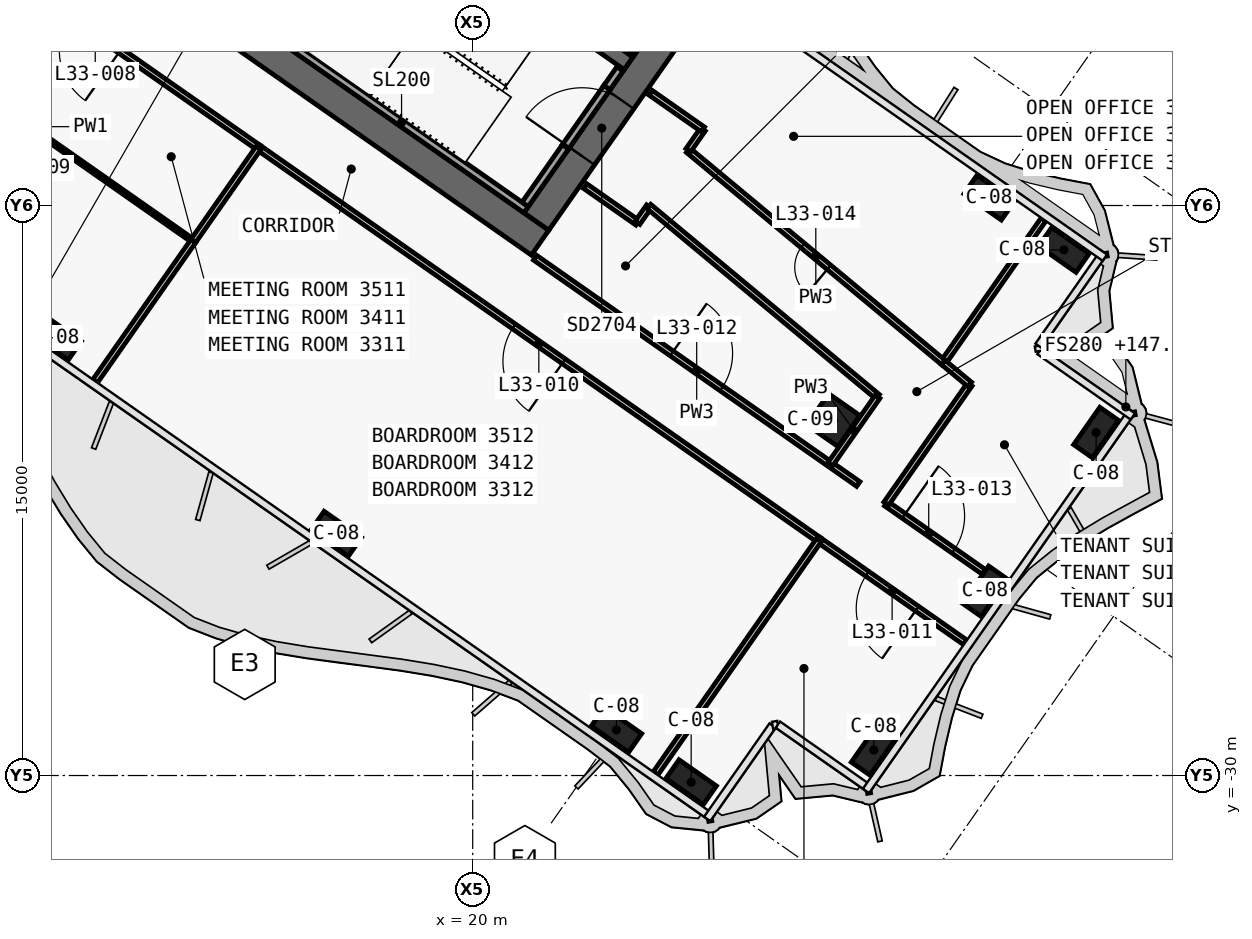
"""IFC4 building model, lengths in metres.
Left out: names, types, materials, properties, quantities, classifications, styles, units other than length and angle.
Written with IfcOpenShell. Run it as: python <this file> out.ifc"""

import sys

from ifc_helpers import new_model, si_unit, direction, frame, frame_2d, origin, origin_2d, place, context, subcontext, project, spatial, polyline, rectangle, outline, extrude, element, fill, save


model = new_model("IFC4")
c1 = context("Model", 3, precision=1e-05, world=origin(), true_north=direction((0.0, 1.0)))
c2 = subcontext(c1, "Body", "Model", "MODEL_VIEW")
j1 = project(units=[si_unit("LENGTHUNIT", "METRE"), si_unit("PLANEANGLEUNIT", "RADIAN")], contexts=[c1])
p1 = place(None, origin())
s1 = spatial("IfcSite", under=j1, at=p1, CompositionType="ELEMENT")
p2 = place(p1, origin())
s2 = spatial("IfcBuilding", under=s1, at=p2, CompositionType="ELEMENT")
p3 = place(p2, frame((0.0, 0.0, 147.6)))
s3 = spatial("IfcBuildingStorey", under=s2, at=p3, CompositionType="ELEMENT", Elevation=147.6)
p4 = place(p3, frame((-0.029, -0.712, 0.0), z_axis=(0.0, 0.0, 1.0), x_axis=(0.819151758019, -0.573576845187, 0.0)))
e1 = element("IfcWall", 1, at=p4, inside=s3, PredefinedType="SHEAR", context=c2, shape_type="SweptSolid", body=[
    extrude(outline(polyline([(26.616, 0.4), (-0.0, 0.4), (0.56, -0.4), (26.616, -0.4), (26.616, 0.4)])), origin(), (0.0, 0.0, 1.0), 3.9),
])
p5 = place(p4, frame((1.166, 0.0, 0.0)))
e2 = element("IfcOpeningElement", 2, at=p5, cuts=e1, PredefinedType="OPENING", context=c2, shape_type="SweptSolid", body=[
    extrude(rectangle(XDim=1.5, YDim=2.1, at=frame_2d((0.75, 1.05))), frame((0.0, 0.41, 0.0), z_axis=(0.0, -1.0, 0.0), x_axis=(1.0, 0.0, 0.0)), (0.0, 0.0, 1.0), 0.82),
])
p6 = place(p4, frame((12.366, 0.0, 0.0)))
e3 = element("IfcOpeningElement", 3, at=p6, cuts=e1, PredefinedType="OPENING", context=c2, shape_type="SweptSolid", body=[
    extrude(rectangle(XDim=1.5, YDim=2.1, at=frame_2d((0.75, 1.05))), frame((0.0, 0.41, 0.0), z_axis=(0.0, -1.0, 0.0), x_axis=(1.0, 0.0, 0.0)), (0.0, 0.0, 1.0), 0.82),
])
p7 = place(p3, frame((21.675, -15.421, 0.0), z_axis=(0.0, 0.0, 1.0), x_axis=(0.573581815061, 0.819148278049, 0.0)))
e4 = element("IfcWall", 4, at=p7, inside=s3, PredefinedType="SHEAR", context=c2, shape_type="SweptSolid", body=[
    extrude(outline(polyline([(9.6, 0.4), (0.0, 0.4), (0.0, -0.4), (9.6, -0.4), (9.6, 0.4)])), origin(), (0.0, 0.0, 1.0), 3.9),
])
p8 = place(p7, frame((6.3, 0.0, 0.0)))
e5 = element("IfcOpeningElement", 5, at=p8, cuts=e4, PredefinedType="OPENING", context=c2, shape_type="SweptSolid", body=[
    extrude(rectangle(XDim=1.8, YDim=2.1, at=frame_2d((0.9, 1.05))), frame((0.0, 0.41, 0.0), z_axis=(0.0, -1.0, 0.0), x_axis=(1.0, 0.0, 0.0)), (0.0, 0.0, 1.0), 0.82),
])
p9 = place(p7, frame((2.1, 0.0, 0.0)))
e6 = element("IfcOpeningElement", 6, at=p9, cuts=e4, PredefinedType="OPENING", context=c2, shape_type="SweptSolid", body=[
    extrude(rectangle(XDim=1.8, YDim=2.1, at=frame_2d((0.9, 1.05))), frame((0.0, 0.41, 0.0), z_axis=(0.0, -1.0, 0.0), x_axis=(1.0, 0.0, 0.0)), (0.0, 0.0, 1.0), 0.82),
])
p10 = place(p3, frame((2.638, 3.768, 0.0), z_axis=(0.0, 0.0, 1.0), x_axis=(0.81915267502, -0.573575535572, 0.0)))
e7 = element("IfcWall", 7, at=p10, inside=s3, PredefinedType="SHEAR", context=c2, shape_type="SweptSolid", body=[
    extrude(outline(polyline([(0.0, 0.2), (0.0, -0.2), (26.2, -0.2), (26.2, 0.2), (0.0, 0.2)])), origin(), (0.0, 0.0, 1.0), 3.9),
])
p11 = place(p10, frame((9.637, 0.0, 0.0)))
e8 = element("IfcOpeningElement", 8, at=p11, cuts=e7, PredefinedType="OPENING", context=c2, shape_type="SweptSolid", body=[
    extrude(rectangle(XDim=1.2, YDim=2.1, at=frame_2d((0.6, 1.05))), frame((0.0, 0.21, 0.0), z_axis=(0.0, -1.0, 0.0), x_axis=(1.0, 0.0, 0.0)), (0.0, 0.0, 1.0), 0.42),
])
p12 = place(p10, frame((11.812, 0.0, 0.0)))
e9 = element("IfcOpeningElement", 9, at=p12, cuts=e7, PredefinedType="OPENING", context=c2, shape_type="SweptSolid", body=[
    extrude(rectangle(XDim=1.2, YDim=2.1, at=frame_2d((0.6, 1.05))), frame((0.0, 0.21, 0.0), z_axis=(0.0, -1.0, 0.0), x_axis=(1.0, 0.0, 0.0)), (0.0, 0.0, 1.0), 0.42),
])
p13 = place(p10, frame((13.988, 0.0, 0.0)))
e10 = element("IfcOpeningElement", 10, at=p13, cuts=e7, PredefinedType="OPENING", context=c2, shape_type="SweptSolid", body=[
    extrude(rectangle(XDim=1.2, YDim=2.1, at=frame_2d((0.6, 1.05))), frame((0.0, 0.21, 0.0), z_axis=(0.0, -1.0, 0.0), x_axis=(1.0, 0.0, 0.0)), (0.0, 0.0, 1.0), 0.42),
])
p14 = place(p10, frame((16.262, 0.0, 0.0)))
e11 = element("IfcOpeningElement", 11, at=p14, cuts=e7, PredefinedType="OPENING", context=c2, shape_type="SweptSolid", body=[
    extrude(rectangle(XDim=1.0, YDim=2.1, at=frame_2d((0.5, 1.05))), frame((0.0, 0.21, 0.0), z_axis=(0.0, -1.0, 0.0), x_axis=(1.0, 0.0, 0.0)), (0.0, 0.0, 1.0), 0.42),
])
for number, where, z_axis, x_axis in (
    (12, (9.038, -18.475, 0.0), (0.0, 0.0, 1.0), (0.819, -0.574, 0.0)),
    (13, (16.41, -23.637, 0.0), (0.0, 0.0, 1.0), (0.819, -0.574, 0.0)),
    (14, (23.782, -28.799, 0.0), (0.0, 0.0, 1.0), (0.819, -0.574, 0.0)),
    (15, (25.748, -30.176, 0.0), (0.0, 0.0, 1.0), (0.819, -0.574, 0.0)),
    (16, (33.591, -14.792, 0.0), (0.0, 0.0, 1.0), (0.819, -0.574, 0.0)),
    (17, (35.556, -16.168, 0.0), (0.0, 0.0, 1.0), (0.819, -0.574, 0.0)),
    (18, (30.553, -29.329, 0.0), (0.0, 0.0, 1.0), (0.574, 0.819, 0.0)),
    (19, (33.479, -25.151, 0.0), (0.0, 0.0, 1.0), (0.574, 0.819, 0.0)),
    (20, (36.404, -20.973, 0.0), (0.0, 0.0, 1.0), (0.574, 0.819, 0.0)),
):
    element("IfcColumn", number, at=place(p3, frame(where, z_axis=z_axis, x_axis=x_axis)), inside=s3, PredefinedType="COLUMN", context=c2, shape_type="SweptSolid", body=[
        extrude(rectangle(XDim=1.2, YDim=0.6, at=origin_2d()), origin(), (0.0, 0.0, 1.0), 3.9),
    ])
p15 = place(p3, frame((29.49, -20.649, 0.0), z_axis=(0.0, 0.0, 1.0), x_axis=(0.819152044289, -0.573576436351, 0.0)))
e21 = element("IfcColumn", 21, at=p15, inside=s3, PredefinedType="COLUMN", context=c2, shape_type="SweptSolid", body=[
    extrude(rectangle(XDim=1.0, YDim=1.0, at=origin_2d()), origin(), (0.0, 0.0, 1.0), 3.9),
])
p16 = place(p3, frame((24.162, -10.998, 0.0), z_axis=(0.0, 0.0, 1.0), x_axis=(0.573612502218, 0.819126789514, 0.0)))
e22 = element("IfcWall", 22, at=p16, inside=s3, PredefinedType="SOLIDWALL", context=c2, shape_type="SweptSolid", body=[
    extrude(rectangle(XDim=1.2, YDim=0.2, at=frame_2d((0.6, 0.0))), origin(), (0.0, 0.0, 1.0), 3.62),
])
p17 = place(p3, frame((14.851, -10.521, 0.0), z_axis=(0.0, 0.0, 1.0), x_axis=(0.819141584393, -0.57359137434, 0.0)))
e23 = element("IfcWall", 23, at=p17, inside=s3, PredefinedType="SOLIDWALL", context=c2, shape_type="SweptSolid", body=[
    extrude(rectangle(XDim=8.0, YDim=0.2, at=frame_2d((4.0, 0.0))), origin(), (0.0, 0.0, 1.0), 3.62),
])
p18 = place(p3, frame((21.38, -14.97, 0.0), z_axis=(0.0, 0.0, 1.0), x_axis=(0.573559770908, 0.819163713305, 0.0)))
e24 = element("IfcWall", 24, at=p18, inside=s3, PredefinedType="SOLIDWALL", context=c2, shape_type="SweptSolid", body=[
    extrude(rectangle(XDim=1.85, YDim=0.2, at=frame_2d((0.925, 0.0))), origin(), (0.0, 0.0, 1.0), 3.62),
])
p19 = place(p3, frame((23.531, -11.898, 0.0), z_axis=(0.0, 0.0, 1.0), x_axis=(0.573708088123, 0.819059844958, 0.0)))
e25 = element("IfcWall", 25, at=p19, inside=s3, PredefinedType="SOLIDWALL", context=c2, shape_type="SweptSolid", body=[
    extrude(rectangle(XDim=0.6, YDim=0.2, at=frame_2d((0.3, 0.0))), origin(), (0.0, 0.0, 1.0), 3.62),
])
p20 = place(p3, frame((22.441, -13.455, 2.15), z_axis=(0.0, 0.0, 1.0), x_axis=(0.573591692345, 0.819141361715, 0.0)))
e26 = element("IfcWall", 26, at=p20, inside=s3, PredefinedType="SOLIDWALL", context=c2, shape_type="SweptSolid", body=[
    extrude(rectangle(XDim=1.9, YDim=0.2, at=frame_2d((0.95, 0.0))), origin(), (0.0, 0.0, 1.0), 1.47),
])
p21 = place(p3, frame((21.642, -16.375, 0.0), z_axis=(0.0, 0.0, 1.0), x_axis=(0.81915236897, -0.573575972658, 0.0)))
e27 = element("IfcWall", 27, at=p21, inside=s3, PredefinedType="PARTITIONING", context=c2, shape_type="SweptSolid", body=[
    extrude(rectangle(XDim=10.382, YDim=0.15, at=frame_2d((5.191, 0.0))), origin(), (0.0, 0.0, 1.0), 3.0),
])
p22 = place(p21, frame((4.391, 0.0, 0.0)))
e28 = element("IfcOpeningElement", 28, at=p22, cuts=e27, PredefinedType="OPENING", context=c2, shape_type="SweptSolid", body=[
    extrude(rectangle(XDim=1.6, YDim=2.1, at=frame_2d((0.8, 1.05))), frame((0.0, 0.085, 0.0), z_axis=(0.0, -1.0, 0.0), x_axis=(1.0, 0.0, 0.0)), (0.0, 0.0, 1.0), 0.17),
])
p23 = place(p3, frame((30.88, -22.843, 0.0), z_axis=(0.0, 0.0, 1.0), x_axis=(0.819133037421, -0.573603580015, 0.0)))
e29 = element("IfcWall", 29, at=p23, inside=s3, PredefinedType="PARTITIONING", context=c2, shape_type="SweptSolid", body=[
    extrude(rectangle(XDim=3.132, YDim=0.15, at=frame_2d((1.566, 0.0))), origin(), (0.0, 0.0, 1.0), 3.0),
])
p24 = place(p23, frame((0.566, 0.0, 0.0)))
e30 = element("IfcOpeningElement", 30, at=p24, cuts=e29, PredefinedType="OPENING", context=c2, shape_type="SweptSolid", body=[
    extrude(rectangle(XDim=1.6, YDim=2.1, at=frame_2d((0.8, 1.05))), frame((0.0, 0.085, 0.0), z_axis=(0.0, -1.0, 0.0), x_axis=(1.0, 0.0, 0.0)), (0.0, 0.0, 1.0), 0.17),
])
p25 = place(p3, frame((14.369, -13.479, 0.0), z_axis=(0.0, 0.0, 1.0), x_axis=(-0.819154371039, 0.573573113393, 0.0)))
e31 = element("IfcWall", 31, at=p25, inside=s3, PredefinedType="PARTITIONING", context=c2, shape_type="SweptSolid", body=[
    extrude(rectangle(XDim=10.502, YDim=0.15, at=frame_2d((5.251, 0.0))), origin(), (0.0, 0.0, 1.0), 3.0),
])
p26 = place(p25, frame((4.451, 0.0, 0.0)))
e32 = element("IfcOpeningElement", 32, at=p26, cuts=e31, PredefinedType="OPENING", context=c2, shape_type="SweptSolid", body=[
    extrude(rectangle(XDim=1.6, YDim=2.1, at=frame_2d((0.8, 1.05))), frame((0.0, 0.085, 0.0), z_axis=(0.0, -1.0, 0.0), x_axis=(1.0, 0.0, 0.0)), (0.0, 0.0, 1.0), 0.17),
])
p27 = place(p3, frame((29.114, -23.804, 0.0), z_axis=(0.0, 0.0, 1.0), x_axis=(-0.81915291695, 0.57357519006, 0.0)))
e33 = element("IfcWall", 33, at=p27, inside=s3, PredefinedType="PARTITIONING", context=c2, shape_type="SweptSolid", body=[
    extrude(rectangle(XDim=18.004, YDim=0.15, at=frame_2d((9.002, 0.0))), origin(), (0.0, 0.0, 1.0), 3.0),
])
p28 = place(p27, frame((8.202, 0.0, 0.0)))
e34 = element("IfcOpeningElement", 34, at=p28, cuts=e33, PredefinedType="OPENING", context=c2, shape_type="SweptSolid", body=[
    extrude(rectangle(XDim=1.6, YDim=2.1, at=frame_2d((0.8, 1.05))), frame((0.0, 0.085, 0.0), z_axis=(0.0, -1.0, 0.0), x_axis=(1.0, 0.0, 0.0)), (0.0, 0.0, 1.0), 0.17),
])
p29 = place(p3, frame((32.962, -26.499, 0.0), z_axis=(0.0, 0.0, 1.0), x_axis=(-0.819139214842, 0.573594758263, 0.0)))
e35 = element("IfcWall", 35, at=p29, inside=s3, PredefinedType="PARTITIONING", context=c2, shape_type="SweptSolid", body=[
    extrude(rectangle(XDim=4.702, YDim=0.15, at=frame_2d((2.351, 0.0))), origin(), (0.0, 0.0, 1.0), 2.9),
])
p30 = place(p29, frame((1.551, 0.0, 0.0)))
e36 = element("IfcOpeningElement", 36, at=p30, cuts=e35, PredefinedType="OPENING", context=c2, shape_type="SweptSolid", body=[
    extrude(rectangle(XDim=1.6, YDim=2.1, at=frame_2d((0.8, 1.05))), frame((0.0, 0.085, 0.0), z_axis=(0.0, -1.0, 0.0), x_axis=(1.0, 0.0, 0.0)), (0.0, 0.0, 1.0), 0.17),
])
p31 = place(p3, frame((35.02, -15.365, 0.0), z_axis=(0.0, 0.0, 1.0), x_axis=(-0.573604943476, -0.819132082646, 0.0)))
e37 = element("IfcWall", 37, at=p31, inside=s3, PredefinedType="PARTITIONING", context=c2, shape_type="SweptSolid", body=[
    extrude(rectangle(XDim=4.596, YDim=0.15, at=frame_2d((2.298, 0.0))), origin(), (0.0, 0.0, 1.0), 2.9),
])
p32 = place(p3, frame((32.384, -19.13, 0.0), z_axis=(0.0, 0.0, 1.0), x_axis=(-0.768750532262, 0.639548762134, 0.0)))
e38 = element("IfcWall", 38, at=p32, inside=s3, PredefinedType="PARTITIONING", context=c2, shape_type="SweptSolid", body=[
    extrude(rectangle(XDim=8.73, YDim=0.15, at=frame_2d((4.365, 0.0))), origin(), (0.0, 0.0, 1.0), 3.0),
])
p33 = place(p32, frame((3.915, 0.0, 0.0)))
e39 = element("IfcOpeningElement", 39, at=p33, cuts=e38, PredefinedType="OPENING", context=c2, shape_type="SweptSolid", body=[
    extrude(rectangle(XDim=0.9, YDim=2.1, at=frame_2d((0.45, 1.05))), frame((0.0, 0.085, 0.0), z_axis=(0.0, -1.0, 0.0), x_axis=(1.0, 0.0, 0.0)), (0.0, 0.0, 1.0), 0.17),
])
p34 = place(p3, frame((25.673, -13.547, 0.0), z_axis=(0.0, 0.0, 1.0), x_axis=(0.573511127478, 0.819197770175, 0.0)))
e40 = element("IfcWall", 40, at=p34, inside=s3, PredefinedType="PARTITIONING", context=c2, shape_type="SweptSolid", body=[
    extrude(rectangle(XDim=0.672, YDim=0.15, at=frame_2d((0.336, 0.0))), origin(), (0.0, 0.0, 1.0), 3.62),
])
for number, where, z_axis, x_axis in (
    (41, (26.058, -12.997, 0.0), (0.0, 0.0, 1.0), (-0.819, 0.574, 0.0)),
    (42, (22.961, -14.49, 0.0), (0.0, 0.0, 1.0), (0.819, -0.574, 0.0)),
):
    element("IfcWall", number, at=place(p3, frame(where, z_axis=z_axis, x_axis=x_axis)), inside=s3, PredefinedType="PARTITIONING", context=c2, shape_type="SweptSolid", body=[
        extrude(rectangle(XDim=1.68, YDim=0.15, at=frame_2d((0.84, 0.0))), origin(), (0.0, 0.0, 1.0), 3.62),
    ])
p35 = place(p3, frame((24.337, -15.454, 0.0), z_axis=(0.0, 0.0, 1.0), x_axis=(0.573870335358, 0.818946175396, 0.0)))
e43 = element("IfcWall", 43, at=p35, inside=s3, PredefinedType="PARTITIONING", context=c2, shape_type="SweptSolid", body=[
    extrude(rectangle(XDim=0.522, YDim=0.15, at=frame_2d((0.261, 0.0))), origin(), (0.0, 0.0, 1.0), 3.62),
])
p36 = place(p3, frame((24.637, -15.027, 0.0), z_axis=(0.0, 0.0, 1.0), x_axis=(0.768763032688, -0.639533736071, 0.0)))
e44 = element("IfcWall", 44, at=p36, inside=s3, PredefinedType="PARTITIONING", context=c2, shape_type="SweptSolid", body=[
    extrude(rectangle(XDim=7.827, YDim=0.15, at=frame_2d((3.914, 0.0))), origin(), (0.0, 0.0, 1.0), 3.0),
])
p37 = place(p3, frame((30.654, -20.032, 0.0), z_axis=(0.0, 0.0, 1.0), x_axis=(-0.573613157475, -0.819126330655, 0.0)))
e45 = element("IfcWall", 45, at=p37, inside=s3, PredefinedType="PARTITIONING", context=c2, shape_type="SweptSolid", body=[
    extrude(rectangle(XDim=2.173, YDim=0.15, at=frame_2d((1.086, 0.0))), origin(), (0.0, 0.0, 1.0), 3.0),
])
p38 = place(p3, frame((30.882, -22.844, 0.0), z_axis=(0.0, 0.0, 1.0), x_axis=(0.573565036961, 0.819160026109, 0.0)))
e46 = element("IfcWall", 46, at=p38, inside=s3, PredefinedType="PARTITIONING", context=c2, shape_type="SweptSolid", body=[
    extrude(rectangle(XDim=3.829, YDim=0.15, at=frame_2d((1.915, 0.0))), origin(), (0.0, 0.0, 1.0), 3.0),
])
p39 = place(p3, frame((33.078, -19.708, 0.0), z_axis=(0.0, 0.0, 1.0), x_axis=(-0.768752765825, 0.639546077336, 0.0)))
e47 = element("IfcWall", 47, at=p39, inside=s3, PredefinedType="PARTITIONING", context=c2, shape_type="SweptSolid", body=[
    extrude(rectangle(XDim=0.903, YDim=0.15, at=frame_2d((0.452, 0.0))), origin(), (0.0, 0.0, 1.0), 3.62),
])
p40 = place(p3, frame((12.646, -15.937, 0.0), z_axis=(0.0, 0.0, 1.0), x_axis=(-0.81914779845, 0.57358249999, 0.0)))
e48 = element("IfcWall", 48, at=p40, inside=s3, PredefinedType="PARTITIONING", context=c2, shape_type="SweptSolid", body=[
    extrude(rectangle(XDim=10.5, YDim=0.1, at=frame_2d((5.25, 0.0))), origin(), (0.0, 0.0, 1.0), 3.0),
])
p41 = place(p40, frame((4.8, 0.0, 0.0)))
e49 = element("IfcOpeningElement", 49, at=p41, cuts=e48, PredefinedType="OPENING", context=c2, shape_type="SweptSolid", body=[
    extrude(rectangle(XDim=0.9, YDim=2.1, at=frame_2d((0.45, 1.05))), frame((0.0, 0.06, 0.0), z_axis=(0.0, -1.0, 0.0), x_axis=(1.0, 0.0, 0.0)), (0.0, 0.0, 1.0), 0.12),
])
p42 = place(p3, frame((12.646, -15.937, 0.0), z_axis=(0.0, 0.0, 1.0), x_axis=(-0.573527897688, -0.819186029284, 0.0)))
e50 = element("IfcWall", 50, at=p42, inside=s3, PredefinedType="PARTITIONING", context=c2, shape_type="SweptSolid", body=[
    extrude(rectangle(XDim=4.499, YDim=0.15, at=frame_2d((2.25, 0.0))), origin(), (0.0, 0.0, 1.0), 2.9),
])
p43 = place(p3, frame((14.367, -13.479, 0.0), z_axis=(0.0, 0.0, 1.0), x_axis=(-0.573598887793, -0.819136323161, 0.0)))
e51 = element("IfcWall", 51, at=p43, inside=s3, PredefinedType="PARTITIONING", context=c2, shape_type="SweptSolid", body=[
    extrude(rectangle(XDim=3.0, YDim=0.15, at=frame_2d((1.5, 0.0))), origin(), (0.0, 0.0, 1.0), 3.62),
])
p44 = place(p3, frame((29.112, -23.803, 0.0), z_axis=(0.0, 0.0, 1.0), x_axis=(-0.573597787563, -0.819137093595, 0.0)))
e52 = element("IfcWall", 52, at=p44, inside=s3, PredefinedType="PARTITIONING", context=c2, shape_type="SweptSolid", body=[
    extrude(rectangle(XDim=7.5, YDim=0.15, at=frame_2d((3.75, 0.0))), origin(), (0.0, 0.0, 1.0), 2.9),
])
p45 = place(p9, origin())
e53 = element("IfcDoor", 53, at=p45, inside=s3, OperationType="DOUBLE_DOOR_SINGLE_SWING", PredefinedType="DOOR", context=c2, shape_type="SweptSolid", body=[
    extrude(rectangle(XDim=1.8, YDim=2.1, at=frame_2d((0.9, 1.05))), frame((0.0, 0.025, 0.0), z_axis=(0.0, -1.0, 0.0), x_axis=(1.0, 0.0, 0.0)), (0.0, 0.0, 1.0), 0.05),
])
fill(e6, e53)
p46 = place(p28, origin())
e54 = element("IfcDoor", 54, at=p46, inside=s3, OperationType="DOUBLE_DOOR_SINGLE_SWING", PredefinedType="DOOR", context=c2, shape_type="SweptSolid", body=[
    extrude(rectangle(XDim=1.6, YDim=2.1, at=frame_2d((0.8, 1.05))), frame((0.0, 0.025, 0.0), z_axis=(0.0, -1.0, 0.0), x_axis=(1.0, 0.0, 0.0)), (0.0, 0.0, 1.0), 0.05),
])
fill(e34, e54)
p47 = place(p30, origin())
e55 = element("IfcDoor", 55, at=p47, inside=s3, OperationType="DOUBLE_DOOR_SINGLE_SWING", PredefinedType="DOOR", context=c2, shape_type="SweptSolid", body=[
    extrude(rectangle(XDim=1.6, YDim=2.1, at=frame_2d((0.8, 1.05))), frame((0.0, 0.025, 0.0), z_axis=(0.0, -1.0, 0.0), x_axis=(1.0, 0.0, 0.0)), (0.0, 0.0, 1.0), 0.05),
])
fill(e36, e55)
p48 = place(p22, origin())
e56 = element("IfcDoor", 56, at=p48, inside=s3, OperationType="DOUBLE_DOOR_SINGLE_SWING", PredefinedType="DOOR", context=c2, shape_type="SweptSolid", body=[
    extrude(rectangle(XDim=1.6, YDim=2.1, at=frame_2d((0.8, 1.05))), frame((0.0, 0.025, 0.0), z_axis=(0.0, -1.0, 0.0), x_axis=(1.0, 0.0, 0.0)), (0.0, 0.0, 1.0), 0.05),
])
fill(e28, e56)
p49 = place(p24, origin())
e57 = element("IfcDoor", 57, at=p49, inside=s3, OperationType="DOUBLE_DOOR_SINGLE_SWING", PredefinedType="DOOR", context=c2, shape_type="SweptSolid", body=[
    extrude(rectangle(XDim=1.6, YDim=2.1, at=frame_2d((0.8, 1.05))), frame((0.0, 0.025, 0.0), z_axis=(0.0, -1.0, 0.0), x_axis=(1.0, 0.0, 0.0)), (0.0, 0.0, 1.0), 0.05),
])
fill(e30, e57)
p50 = place(p33, origin())
e58 = element("IfcDoor", 58, at=p50, inside=s3, OperationType="SINGLE_SWING_RIGHT", PredefinedType="DOOR", context=c2, shape_type="SweptSolid", body=[
    extrude(rectangle(XDim=0.9, YDim=2.1, at=frame_2d((0.45, 1.05))), frame((0.0, 0.025, 0.0), z_axis=(0.0, -1.0, 0.0), x_axis=(1.0, 0.0, 0.0)), (0.0, 0.0, 1.0), 0.05),
])
fill(e39, e58)
save(model, sys.argv[1])
